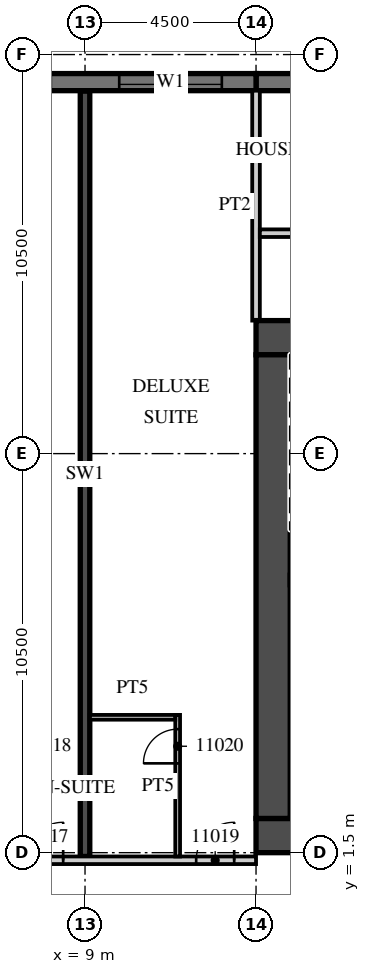
"""IFC4 building model, lengths in metres.
Left out: names, types, materials, properties, quantities, classifications, styles, units other than length and angle.
Written with IfcOpenShell. Run it as: python <this file> out.ifc"""

import sys

from ifc_helpers import new_model, si_unit, direction, frame, frame_2d, origin, place, context, subcontext, project, spatial, rectangle, extrude, element, fill, save


model = new_model("IFC4")
c1 = context("Model", 3, precision=1e-05, world=origin(), true_north=direction((0.0, 1.0)))
c2 = subcontext(c1, "Body", "Model", "MODEL_VIEW")
j1 = project(units=[si_unit("LENGTHUNIT", "METRE"), si_unit("PLANEANGLEUNIT", "RADIAN")], contexts=[c1])
p1 = place(None, origin())
s1 = spatial("IfcSite", under=j1, at=p1, CompositionType="ELEMENT")
p2 = place(p1, origin())
s2 = spatial("IfcBuilding", under=s1, at=p2, CompositionType="ELEMENT")
p3 = place(p2, frame((0.0, 0.0, 66.6)))
s3 = spatial("IfcBuildingStorey", under=s2, at=p3, CompositionType="ELEMENT", Elevation=66.6)
p4 = place(p3, frame((9.0, 1.4, 0.0), z_axis=(0.0, 0.0, 1.0), x_axis=(0.0, 1.0, 0.0)))
e1 = element("IfcWall", 1, at=p4, inside=s3, PredefinedType="SHEAR", context=c2, shape_type="SweptSolid", body=[
    extrude(rectangle(XDim=20.14, YDim=0.25, at=frame_2d((10.07, 0.0))), origin(), (0.0, 0.0, 1.0), 3.3),
])
p5 = place(p3, frame((31.5, 21.775, 0.0), z_axis=(0.0, 0.0, 1.0), x_axis=(-1.0, 0.0, 0.0)))
e2 = element("IfcWall", 2, at=p5, inside=s3, PredefinedType="SOLIDWALL", context=c2, shape_type="SweptSolid", body=[
    extrude(rectangle(XDim=18.0, YDim=0.45, at=frame_2d((9.0, 0.0))), origin(), (0.0, 0.0, 1.0), 3.02),
])
p6 = place(p3, frame((13.5, 21.775, 0.0), z_axis=(0.0, 0.0, 1.0), x_axis=(-1.0, 0.0, 0.0)))
e3 = element("IfcWall", 3, at=p6, inside=s3, PredefinedType="SOLIDWALL", context=c2, shape_type="SweptSolid", body=[
    extrude(rectangle(XDim=54.5, YDim=0.45, at=frame_2d((27.25, 0.0))), origin(), (0.0, 0.0, 1.0), 3.02),
])
p7 = place(p6, frame((0.9, 0.0, 0.45)))
e4 = element("IfcOpeningElement", 4, at=p7, cuts=e3, PredefinedType="OPENING", context=c2, shape_type="SweptSolid", body=[
    extrude(rectangle(XDim=2.7, YDim=2.25, at=frame_2d((1.35, 1.125))), frame((0.0, 0.235, 0.0), z_axis=(0.0, -1.0, 0.0), x_axis=(1.0, 0.0, 0.0)), (0.0, 0.0, 1.0), 0.47),
])
p8 = place(p6, frame((5.4, 0.0, 0.45)))
e5 = element("IfcOpeningElement", 5, at=p8, cuts=e3, PredefinedType="OPENING", context=c2, shape_type="SweptSolid", body=[
    extrude(rectangle(XDim=2.7, YDim=2.25, at=frame_2d((1.35, 1.125))), frame((0.0, 0.235, 0.0), z_axis=(0.0, -1.0, 0.0), x_axis=(1.0, 0.0, 0.0)), (0.0, 0.0, 1.0), 0.47),
])
p9 = place(p6, frame((9.9, 0.0, 0.45)))
e6 = element("IfcOpeningElement", 6, at=p9, cuts=e3, PredefinedType="OPENING", context=c2, shape_type="SweptSolid", body=[
    extrude(rectangle(XDim=2.7, YDim=2.25, at=frame_2d((1.35, 1.125))), frame((0.0, 0.235, 0.0), z_axis=(0.0, -1.0, 0.0), x_axis=(1.0, 0.0, 0.0)), (0.0, 0.0, 1.0), 0.47),
])
p10 = place(p6, frame((14.4, 0.0, 0.45)))
e7 = element("IfcOpeningElement", 7, at=p10, cuts=e3, PredefinedType="OPENING", context=c2, shape_type="SweptSolid", body=[
    extrude(rectangle(XDim=2.7, YDim=2.25, at=frame_2d((1.35, 1.125))), frame((0.0, 0.235, 0.0), z_axis=(0.0, -1.0, 0.0), x_axis=(1.0, 0.0, 0.0)), (0.0, 0.0, 1.0), 0.47),
])
p11 = place(p6, frame((18.9, 0.0, 0.45)))
e8 = element("IfcOpeningElement", 8, at=p11, cuts=e3, PredefinedType="OPENING", context=c2, shape_type="SweptSolid", body=[
    extrude(rectangle(XDim=2.7, YDim=2.25, at=frame_2d((1.35, 1.125))), frame((0.0, 0.235, 0.0), z_axis=(0.0, -1.0, 0.0), x_axis=(1.0, 0.0, 0.0)), (0.0, 0.0, 1.0), 0.47),
])
p12 = place(p6, frame((23.4, 0.0, 0.45)))
e9 = element("IfcOpeningElement", 9, at=p12, cuts=e3, PredefinedType="OPENING", context=c2, shape_type="SweptSolid", body=[
    extrude(rectangle(XDim=2.7, YDim=2.25, at=frame_2d((1.35, 1.125))), frame((0.0, 0.235, 0.0), z_axis=(0.0, -1.0, 0.0), x_axis=(1.0, 0.0, 0.0)), (0.0, 0.0, 1.0), 0.47),
])
p13 = place(p6, frame((27.9, 0.0, 0.45)))
e10 = element("IfcOpeningElement", 10, at=p13, cuts=e3, PredefinedType="OPENING", context=c2, shape_type="SweptSolid", body=[
    extrude(rectangle(XDim=2.7, YDim=2.25, at=frame_2d((1.35, 1.125))), frame((0.0, 0.235, 0.0), z_axis=(0.0, -1.0, 0.0), x_axis=(1.0, 0.0, 0.0)), (0.0, 0.0, 1.0), 0.47),
])
p14 = place(p6, frame((32.4, 0.0, 0.45)))
e11 = element("IfcOpeningElement", 11, at=p14, cuts=e3, PredefinedType="OPENING", context=c2, shape_type="SweptSolid", body=[
    extrude(rectangle(XDim=2.7, YDim=2.25, at=frame_2d((1.35, 1.125))), frame((0.0, 0.235, 0.0), z_axis=(0.0, -1.0, 0.0), x_axis=(1.0, 0.0, 0.0)), (0.0, 0.0, 1.0), 0.47),
])
p15 = place(p6, frame((36.9, 0.0, 0.45)))
e12 = element("IfcOpeningElement", 12, at=p15, cuts=e3, PredefinedType="OPENING", context=c2, shape_type="SweptSolid", body=[
    extrude(rectangle(XDim=2.7, YDim=2.25, at=frame_2d((1.35, 1.125))), frame((0.0, 0.235, 0.0), z_axis=(0.0, -1.0, 0.0), x_axis=(1.0, 0.0, 0.0)), (0.0, 0.0, 1.0), 0.47),
])
p16 = place(p6, frame((41.4, 0.0, 0.45)))
e13 = element("IfcOpeningElement", 13, at=p16, cuts=e3, PredefinedType="OPENING", context=c2, shape_type="SweptSolid", body=[
    extrude(rectangle(XDim=2.7, YDim=2.25, at=frame_2d((1.35, 1.125))), frame((0.0, 0.235, 0.0), z_axis=(0.0, -1.0, 0.0), x_axis=(1.0, 0.0, 0.0)), (0.0, 0.0, 1.0), 0.47),
])
p17 = place(p6, frame((45.9, 0.0, 0.45)))
e14 = element("IfcOpeningElement", 14, at=p17, cuts=e3, PredefinedType="OPENING", context=c2, shape_type="SweptSolid", body=[
    extrude(rectangle(XDim=2.7, YDim=2.25, at=frame_2d((1.35, 1.125))), frame((0.0, 0.235, 0.0), z_axis=(0.0, -1.0, 0.0), x_axis=(1.0, 0.0, 0.0)), (0.0, 0.0, 1.0), 0.47),
])
p18 = place(p6, frame((50.4, 0.0, 0.45)))
e15 = element("IfcOpeningElement", 15, at=p18, cuts=e3, PredefinedType="OPENING", context=c2, shape_type="SweptSolid", body=[
    extrude(rectangle(XDim=2.7, YDim=2.25, at=frame_2d((1.35, 1.125))), frame((0.0, 0.235, 0.0), z_axis=(0.0, -1.0, 0.0), x_axis=(1.0, 0.0, 0.0)), (0.0, 0.0, 1.0), 0.47),
])
p19 = place(p3, frame((13.5, 15.5, 0.0), z_axis=(0.0, 0.0, 1.0), x_axis=(0.0, 1.0, 0.0)))
e16 = element("IfcWall", 16, at=p19, inside=s3, PredefinedType="PARTITIONING", context=c2, shape_type="SweptSolid", body=[
    extrude(rectangle(XDim=6.05, YDim=0.2, at=frame_2d((3.025, 0.0))), origin(), (0.0, 0.0, 1.0), 3.02),
])
p20 = place(p3, frame((-44.55, 1.3, 0.0), z_axis=(0.0, 0.0, 1.0), x_axis=(1.0, 0.0, 0.0)))
e17 = element("IfcWall", 17, at=p20, inside=s3, PredefinedType="PARTITIONING", context=c2, shape_type="SweptSolid", body=[
    extrude(rectangle(XDim=58.05, YDim=0.2, at=frame_2d((29.025, 0.0))), origin(), (0.0, 0.0, 1.0), 3.02),
])
p21 = place(p20, frame((0.525, 0.0, 0.0)))
e18 = element("IfcOpeningElement", 18, at=p21, cuts=e17, PredefinedType="OPENING", context=c2, shape_type="SweptSolid", body=[
    extrude(rectangle(XDim=1.0, YDim=2.1, at=frame_2d((0.5, 1.05))), frame((0.0, 0.11, 0.0), z_axis=(0.0, -1.0, 0.0), x_axis=(1.0, 0.0, 0.0)), (0.0, 0.0, 1.0), 0.22),
])
p22 = place(p20, frame((6.975, 0.0, 0.0)))
e19 = element("IfcOpeningElement", 19, at=p22, cuts=e17, PredefinedType="OPENING", context=c2, shape_type="SweptSolid", body=[
    extrude(rectangle(XDim=1.0, YDim=2.1, at=frame_2d((0.5, 1.05))), frame((0.0, 0.11, 0.0), z_axis=(0.0, -1.0, 0.0), x_axis=(1.0, 0.0, 0.0)), (0.0, 0.0, 1.0), 0.22),
])
p23 = place(p20, frame((10.987, 0.0, 0.0)))
e20 = element("IfcOpeningElement", 20, at=p23, cuts=e17, PredefinedType="OPENING", context=c2, shape_type="SweptSolid", body=[
    extrude(rectangle(XDim=1.2, YDim=2.1, at=frame_2d((0.6, 1.05))), frame((0.0, 0.11, 0.0), z_axis=(0.0, -1.0, 0.0), x_axis=(1.0, 0.0, 0.0)), (0.0, 0.0, 1.0), 0.22),
])
p24 = place(p20, frame((19.987, 0.0, 0.0)))
e21 = element("IfcOpeningElement", 21, at=p24, cuts=e17, PredefinedType="OPENING", context=c2, shape_type="SweptSolid", body=[
    extrude(rectangle(XDim=1.2, YDim=2.1, at=frame_2d((0.6, 1.05))), frame((0.0, 0.11, 0.0), z_axis=(0.0, -1.0, 0.0), x_axis=(1.0, 0.0, 0.0)), (0.0, 0.0, 1.0), 0.22),
])
p25 = place(p20, frame((29.5, 0.0, 0.0)))
e22 = element("IfcOpeningElement", 22, at=p25, cuts=e17, PredefinedType="OPENING", context=c2, shape_type="SweptSolid", body=[
    extrude(rectangle(XDim=1.0, YDim=2.1, at=frame_2d((0.5, 1.05))), frame((0.0, 0.11, 0.0), z_axis=(0.0, -1.0, 0.0), x_axis=(1.0, 0.0, 0.0)), (0.0, 0.0, 1.0), 0.22),
])
p26 = place(p20, frame((33.975, 0.0, 0.0)))
e23 = element("IfcOpeningElement", 23, at=p26, cuts=e17, PredefinedType="OPENING", context=c2, shape_type="SweptSolid", body=[
    extrude(rectangle(XDim=1.0, YDim=2.1, at=frame_2d((0.5, 1.05))), frame((0.0, 0.11, 0.0), z_axis=(0.0, -1.0, 0.0), x_axis=(1.0, 0.0, 0.0)), (0.0, 0.0, 1.0), 0.22),
])
p27 = place(p20, frame((40.912, 0.0, 0.0)))
e24 = element("IfcOpeningElement", 24, at=p27, cuts=e17, PredefinedType="OPENING", context=c2, shape_type="SweptSolid", body=[
    extrude(rectangle(XDim=1.2, YDim=2.1, at=frame_2d((0.6, 1.05))), frame((0.0, 0.11, 0.0), z_axis=(0.0, -1.0, 0.0), x_axis=(1.0, 0.0, 0.0)), (0.0, 0.0, 1.0), 0.22),
])
p28 = place(p20, frame((47.5, 0.0, 0.0)))
e25 = element("IfcOpeningElement", 25, at=p28, cuts=e17, PredefinedType="OPENING", context=c2, shape_type="SweptSolid", body=[
    extrude(rectangle(XDim=1.0, YDim=2.1, at=frame_2d((0.5, 1.05))), frame((0.0, 0.11, 0.0), z_axis=(0.0, -1.0, 0.0), x_axis=(1.0, 0.0, 0.0)), (0.0, 0.0, 1.0), 0.22),
])
p29 = place(p20, frame((51.975, 0.0, 0.0)))
e26 = element("IfcOpeningElement", 26, at=p29, cuts=e17, PredefinedType="OPENING", context=c2, shape_type="SweptSolid", body=[
    extrude(rectangle(XDim=1.0, YDim=2.1, at=frame_2d((0.5, 1.05))), frame((0.0, 0.11, 0.0), z_axis=(0.0, -1.0, 0.0), x_axis=(1.0, 0.0, 0.0)), (0.0, 0.0, 1.0), 0.22),
])
p30 = place(p20, frame((56.475, 0.0, 0.0)))
e27 = element("IfcOpeningElement", 27, at=p30, cuts=e17, PredefinedType="OPENING", context=c2, shape_type="SweptSolid", body=[
    extrude(rectangle(XDim=1.0, YDim=2.1, at=frame_2d((0.5, 1.05))), frame((0.0, 0.11, 0.0), z_axis=(0.0, -1.0, 0.0), x_axis=(1.0, 0.0, 0.0)), (0.0, 0.0, 1.0), 0.22),
])
p31 = place(p3, frame((11.438, 1.4, 0.0), z_axis=(0.0, 0.0, 1.0), x_axis=(0.0, 1.0, 0.0)))
e28 = element("IfcWall", 28, at=p31, inside=s3, PredefinedType="PARTITIONING", context=c2, shape_type="SweptSolid", body=[
    extrude(rectangle(XDim=3.725, YDim=0.125, at=frame_2d((1.863, 0.0))), origin(), (0.0, 0.0, 1.0), 3.02),
])
p32 = place(p31, frame((2.45, 0.0, 0.0)))
e29 = element("IfcOpeningElement", 29, at=p32, cuts=e28, PredefinedType="OPENING", context=c2, shape_type="SweptSolid", body=[
    extrude(rectangle(XDim=0.9, YDim=2.1, at=frame_2d((0.45, 1.05))), frame((0.0, 0.073, 0.0), z_axis=(0.0, -1.0, 0.0), x_axis=(1.0, 0.0, 0.0)), (0.0, 0.0, 1.0), 0.145),
])
p33 = place(p3, frame((9.125, 5.062, 0.0), z_axis=(0.0, 0.0, 1.0), x_axis=(1.0, 0.0, 0.0)))
e30 = element("IfcWall", 30, at=p33, inside=s3, PredefinedType="PARTITIONING", context=c2, shape_type="SweptSolid", body=[
    extrude(rectangle(XDim=2.25, YDim=0.125, at=frame_2d((1.125, 0.0))), origin(), (0.0, 0.0, 1.0), 3.02),
])
p34 = place(p3, frame((13.5, 1.95, 0.0), z_axis=(0.0, 0.0, 1.0), x_axis=(1.0, 0.0, 0.0)))
e31 = element("IfcWall", 31, at=p34, inside=s3, PredefinedType="SHEAR", context=c2, shape_type="SweptSolid", body=[
    extrude(rectangle(XDim=18.0, YDim=0.9, at=frame_2d((9.0, 0.0))), origin(), (0.0, 0.0, 1.0), 3.02),
])
p35 = place(p34, frame((1.475, 0.0, 0.0)))
e32 = element("IfcOpeningElement", 32, at=p35, cuts=e31, PredefinedType="OPENING", context=c2, shape_type="SweptSolid", body=[
    extrude(rectangle(XDim=1.8, YDim=2.1, at=frame_2d((0.9, 1.05))), frame((0.0, 0.46, 0.0), z_axis=(0.0, -1.0, 0.0), x_axis=(1.0, 0.0, 0.0)), (0.0, 0.0, 1.0), 0.92),
])
p36 = place(p3, frame((13.5, 15.05, 0.0), z_axis=(0.0, 0.0, 1.0), x_axis=(1.0, 0.0, 0.0)))
e33 = element("IfcWall", 33, at=p36, inside=s3, PredefinedType="SHEAR", context=c2, shape_type="SweptSolid", body=[
    extrude(rectangle(XDim=6.8, YDim=0.9, at=frame_2d((3.4, 0.0))), origin(), (0.0, 0.0, 1.0), 3.02),
])
p37 = place(p36, frame((4.725, 0.0, 0.0)))
e34 = element("IfcOpeningElement", 34, at=p37, cuts=e33, PredefinedType="OPENING", context=c2, shape_type="SweptSolid", body=[
    extrude(rectangle(XDim=1.2, YDim=2.1, at=frame_2d((0.6, 1.05))), frame((0.0, 0.46, 0.0), z_axis=(0.0, -1.0, 0.0), x_axis=(1.0, 0.0, 0.0)), (0.0, 0.0, 1.0), 0.92),
])
p38 = place(p3, frame((13.95, 2.4, 0.0), z_axis=(0.0, 0.0, 1.0), x_axis=(0.0, 1.0, 0.0)))
e35 = element("IfcWall", 35, at=p38, inside=s3, PredefinedType="SHEAR", context=c2, shape_type="SweptSolid", body=[
    extrude(rectangle(XDim=12.2, YDim=0.9, at=frame_2d((6.1, 0.0))), origin(), (0.0, 0.0, 1.0), 3.02),
])
p39 = place(p3, frame((13.6, 17.8, 0.0), z_axis=(0.0, 0.0, 1.0), x_axis=(1.0, 0.0, 0.0)))
e36 = element("IfcWall", 36, at=p39, inside=s3, PredefinedType="PARTITIONING", context=c2, shape_type="SweptSolid", body=[
    extrude(rectangle(XDim=30.95, YDim=0.2, at=frame_2d((15.475, 0.0))), origin(), (0.0, 0.0, 1.0), 3.02),
])
p40 = place(p39, frame((17.812, 0.0, 0.0)))
e37 = element("IfcOpeningElement", 37, at=p40, cuts=e36, PredefinedType="OPENING", context=c2, shape_type="SweptSolid", body=[
    extrude(rectangle(XDim=0.9, YDim=2.1, at=frame_2d((0.45, 1.05))), frame((0.0, 0.11, 0.0), z_axis=(0.0, -1.0, 0.0), x_axis=(1.0, 0.0, 0.0)), (0.0, 0.0, 1.0), 0.22),
])
p41 = place(p39, frame((9.512, 0.0, 0.0)))
e38 = element("IfcOpeningElement", 38, at=p41, cuts=e36, PredefinedType="OPENING", context=c2, shape_type="SweptSolid", body=[
    extrude(rectangle(XDim=0.9, YDim=2.1, at=frame_2d((0.45, 1.05))), frame((0.0, 0.11, 0.0), z_axis=(0.0, -1.0, 0.0), x_axis=(1.0, 0.0, 0.0)), (0.0, 0.0, 1.0), 0.22),
])
p42 = place(p7, origin())
e39 = element("IfcWindow", 39, at=p42, inside=s3, PartitioningType="SINGLE_PANEL", PredefinedType="WINDOW", context=c2, shape_type="SweptSolid", body=[
    extrude(rectangle(XDim=2.7, YDim=2.25, at=frame_2d((1.35, 1.125))), frame((0.0, 0.09, 0.0), z_axis=(0.0, -1.0, 0.0), x_axis=(1.0, 0.0, 0.0)), (0.0, 0.0, 1.0), 0.06),
])
fill(e4, e39)
p43 = place(p29, origin())
e40 = element("IfcDoor", 40, at=p43, inside=s3, OperationType="SINGLE_SWING_RIGHT", PredefinedType="DOOR", context=c2, shape_type="SweptSolid", body=[
    extrude(rectangle(XDim=1.0, YDim=2.1, at=frame_2d((0.5, 1.05))), frame((0.0, 0.025, 0.0), z_axis=(0.0, -1.0, 0.0), x_axis=(1.0, 0.0, 0.0)), (0.0, 0.0, 1.0), 0.05),
])
fill(e26, e40)
p44 = place(p30, origin())
e41 = element("IfcDoor", 41, at=p44, inside=s3, OperationType="SINGLE_SWING_RIGHT", PredefinedType="DOOR", context=c2, shape_type="SweptSolid", body=[
    extrude(rectangle(XDim=1.0, YDim=2.1, at=frame_2d((0.5, 1.05))), frame((0.0, 0.025, 0.0), z_axis=(0.0, -1.0, 0.0), x_axis=(1.0, 0.0, 0.0)), (0.0, 0.0, 1.0), 0.05),
])
fill(e27, e41)
p45 = place(p32, origin())
e42 = element("IfcDoor", 42, at=p45, inside=s3, OperationType="SINGLE_SWING_LEFT", PredefinedType="DOOR", context=c2, shape_type="SweptSolid", body=[
    extrude(rectangle(XDim=0.9, YDim=2.1, at=frame_2d((0.45, 1.05))), frame((0.0, 0.025, 0.0), z_axis=(0.0, -1.0, 0.0), x_axis=(1.0, 0.0, 0.0)), (0.0, 0.0, 1.0), 0.05),
])
fill(e29, e42)
save(model, sys.argv[1])
